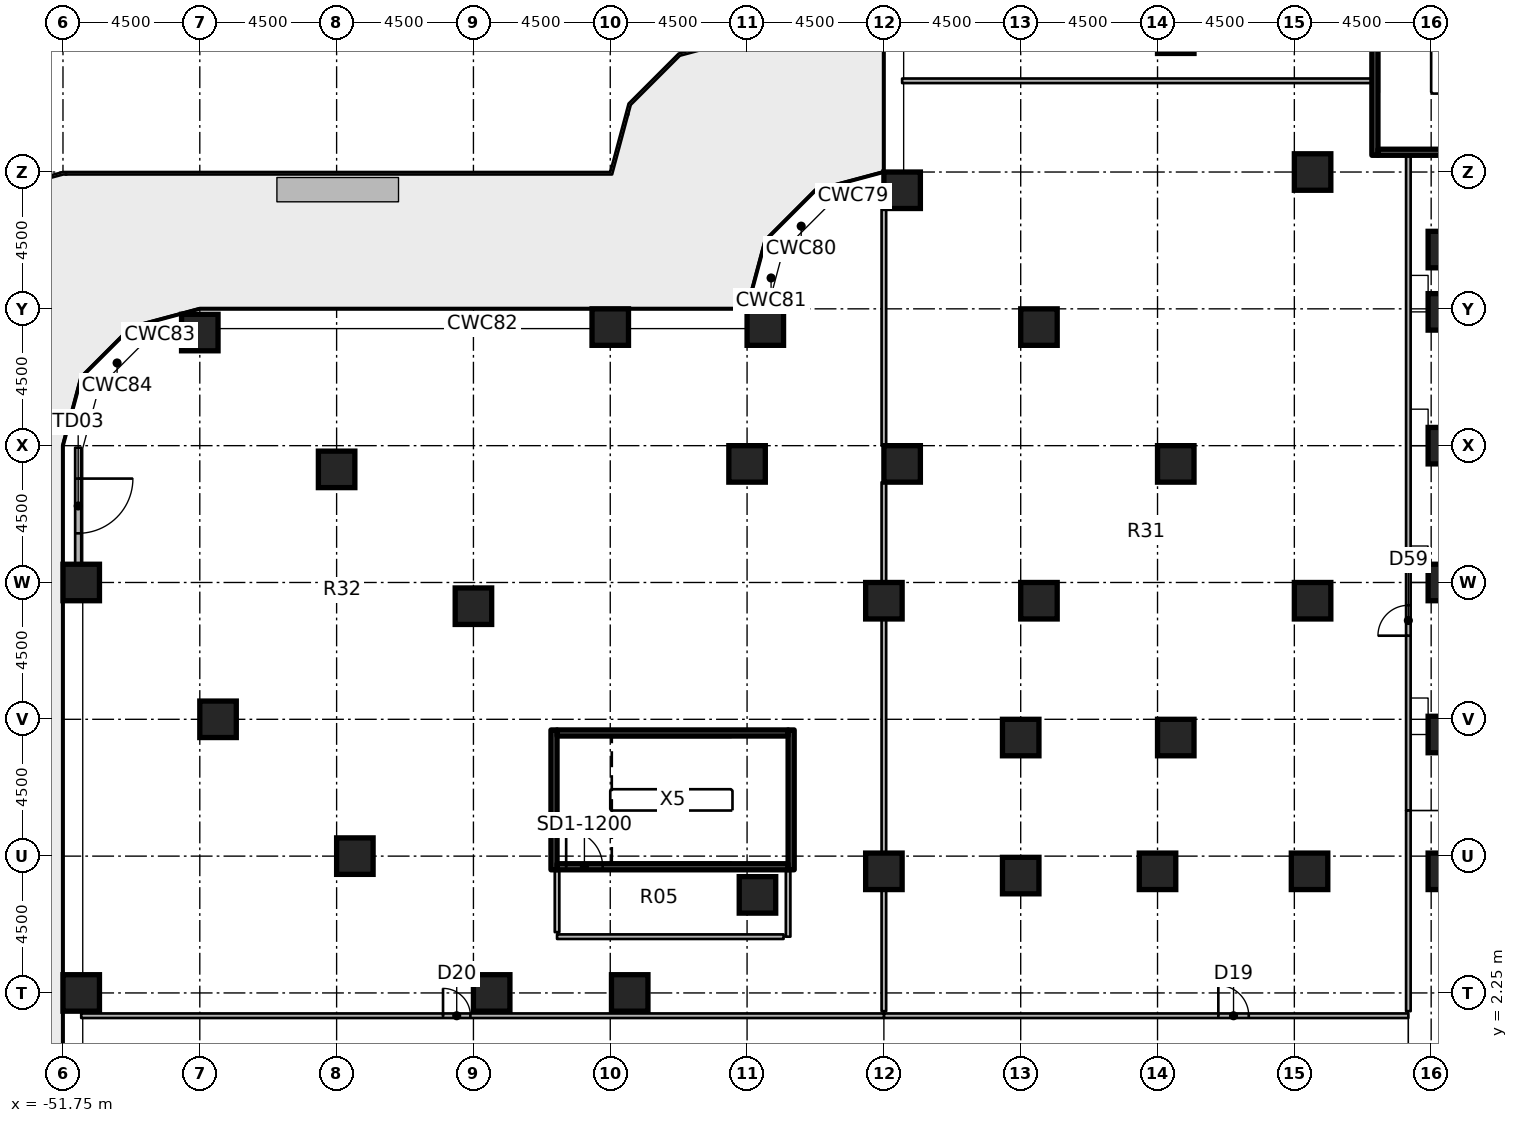
"""IFC4 building model, lengths in metres.
Left out: names, types, materials, properties, quantities, classifications, styles, units other than length and angle.
Written with IfcOpenShell. Run it as: python <this file> out.ifc"""

import sys

from ifc_helpers import new_model, si_unit, direction, frame, frame_2d, origin, origin_2d, place, context, subcontext, project, spatial, rectangle, extrude, element, fill, save


model = new_model("IFC4")
c1 = context("Model", 3, precision=1e-05, world=origin(), true_north=direction((0.0, 1.0)))
c2 = subcontext(c1, "Body", "Model", "MODEL_VIEW")
j1 = project(units=[si_unit("LENGTHUNIT", "METRE"), si_unit("PLANEANGLEUNIT", "RADIAN")], contexts=[c1])
p1 = place(None, origin())
s1 = spatial("IfcSite", under=j1, at=p1, CompositionType="ELEMENT")
p2 = place(p1, origin())
s2 = spatial("IfcBuilding", under=s1, at=p2, CompositionType="ELEMENT")
p3 = place(p2, frame((0.0, 0.0, 7.0)))
s3 = spatial("IfcBuildingStorey", under=s2, at=p3, CompositionType="ELEMENT", Elevation=7.0)
for number, where, z_axis, x_axis in (
    (1, (-51.15, 2.25, 0.0), (0.0, 0.0, 1.0), (1.0, 0.0, 0.0)),
    (2, (-51.15, 15.75, 0.0), (0.0, 0.0, 1.0), (1.0, 0.0, 0.0)),
    (3, (-46.65, 11.25, 0.0), (0.0, 0.0, 1.0), (1.0, 0.0, 0.0)),
    (4, (-47.25, 23.97, 0.0), (0.0, 0.0, 1.0), (1.0, 0.0, 0.0)),
    (5, (-42.15, 6.75, 0.0), (0.0, 0.0, 1.0), (1.0, 0.0, 0.0)),
    (6, (-42.75, 19.47, 0.0), (0.0, 0.0, 1.0), (1.0, 0.0, 0.0)),
    (7, (-37.65, 2.25, 0.0), (0.0, 0.0, 1.0), (1.0, 0.0, 0.0)),
    (8, (-38.25, 14.97, 0.0), (0.0, 0.0, 1.0), (1.0, 0.0, 0.0)),
    (9, (-33.11, 2.25, 0.0), (0.0, 0.0, 1.0), (1.0, 0.0, 0.0)),
    (10, (-33.75, 24.15, 0.0), (0.0, 0.0, 1.0), (1.0, 0.0, 0.0)),
    (11, (-28.908, 5.475, 0.0), (0.0, 0.0, 1.0), (1.0, 0.0, 0.0)),
    (12, (-29.25, 19.65, 0.0), (0.0, 0.0, 1.0), (1.0, 0.0, 0.0)),
    (13, (-28.65, 24.15, 0.0), (0.0, 0.0, 1.0), (1.0, 0.0, 0.0)),
    (14, (-24.75, 6.25, 0.0), (0.0, 0.0, 1.0), (1.0, 0.0, 0.0)),
    (15, (-24.75, 15.15, 0.0), (0.0, 0.0, 1.0), (1.0, 0.0, 0.0)),
    (16, (-24.15, 19.65, 0.0), (0.0, 0.0, 1.0), (1.0, 0.0, 0.0)),
    (17, (-24.15, 28.65, 0.0), (0.0, 0.0, 1.0), (1.0, 0.0, 0.0)),
    (18, (-20.25, 6.11, 0.0), (0.0, 0.0, 1.0), (1.0, 0.0, 0.0)),
    (19, (-20.25, 10.65, 0.0), (0.0, 0.0, 1.0), (1.0, 0.0, 0.0)),
    (20, (-19.65, 15.15, 0.0), (0.0, 0.0, 1.0), (1.0, 0.0, 0.0)),
    (21, (-19.65, 24.15, 0.0), (0.0, 0.0, 1.0), (1.0, 0.0, 0.0)),
    (22, (-15.75, 6.25, 0.0), (0.0, 0.0, 1.0), (1.0, 0.0, 0.0)),
    (23, (-15.15, 10.65, 0.0), (0.0, 0.0, 1.0), (1.0, 0.0, 0.0)),
    (24, (-15.15, 19.65, 0.0), (0.0, 0.0, 1.0), (1.0, 0.0, 0.0)),
    (25, (-15.15, 33.75, 0.0), (0.0, 0.0, 1.0), (1.0, 0.0, 0.0)),
    (26, (-10.75, 6.25, 0.0), (0.0, 0.0, 1.0), (1.0, 0.0, 0.0)),
    (27, (-10.65, 15.15, 0.0), (0.0, 0.0, 1.0), (1.0, 0.0, 0.0)),
    (28, (-10.65, 29.25, 0.0), (0.0, 0.0, 1.0), (1.0, 0.0, 0.0)),
    (29, (-6.25, 6.25, 0.0), (0.0, 0.0, 1.0), (1.0, 0.0, 0.0)),
    (30, (-6.25, 10.75, 0.0), (0.0, 0.0, 1.0), (1.0, 0.0, 0.0)),
    (31, (-6.25, 15.75, 0.0), (0.0, 0.0, 1.0), (1.0, 0.0, 0.0)),
    (32, (-6.25, 20.25, 0.0), (0.0, 0.0, 1.0), (1.0, 0.0, 0.0)),
    (33, (-6.25, 24.65, 0.0), (0.0, 0.0, 1.0), (1.0, 0.0, 0.0)),
    (34, (-6.25, 26.7, 0.0), (0.0, 0.0, 1.0), (1.0, 0.0, 0.0)),
):
    element("IfcColumn", number, at=place(p3, frame(where, z_axis=z_axis, x_axis=x_axis)), inside=s3, PredefinedType="COLUMN", context=c2, shape_type="SweptSolid", body=[
        extrude(rectangle(XDim=1.2, YDim=1.2, at=origin_2d()), origin(), (0.0, 0.0, 1.0), 4.55),
    ])
p4 = place(p3, frame((-51.25, 20.184, 0.0), z_axis=(0.0, 0.0, 1.0), x_axis=(0.0, -1.0, 0.0)))
e35 = element("IfcWall", 35, at=p4, inside=s3, PredefinedType="SOLIDWALL", context=c2, shape_type="SweptSolid", body=[
    extrude(rectangle(XDim=3.834, YDim=0.2, at=frame_2d((1.917, 0.0))), origin(), (0.0, 0.0, 1.0), 4.55),
])
p5 = place(p4, frame((1.017, 0.0, 0.0)))
e36 = element("IfcOpeningElement", 36, at=p5, cuts=e35, PredefinedType="OPENING", context=c2, shape_type="SweptSolid", body=[
    extrude(rectangle(XDim=1.8, YDim=2.4, at=frame_2d((0.9, 1.2))), frame((0.0, 0.11, 0.0), z_axis=(0.0, -1.0, 0.0), x_axis=(1.0, 0.0, 0.0)), (0.0, 0.0, 1.0), 0.22),
])
p6 = place(p3, frame((-8.6, 29.8, 0.0), z_axis=(0.0, 0.0, 1.0), x_axis=(0.0, 1.0, 0.0)))
e37 = element("IfcWall", 37, at=p6, inside=s3, PredefinedType="SHEAR", context=c2, shape_type="SweptSolid", body=[
    extrude(rectangle(XDim=8.0, YDim=0.2, at=frame_2d((4.0, 0.0))), origin(), (0.0, 0.0, 1.0), 4.55),
])
p7 = place(p3, frame((-8.5, 29.9, 0.0), z_axis=(0.0, 0.0, 1.0), x_axis=(1.0, 0.0, 0.0)))
e38 = element("IfcWall", 38, at=p7, inside=s3, PredefinedType="SHEAR", context=c2, shape_type="SweptSolid", body=[
    extrude(rectangle(XDim=4.2, YDim=0.2, at=frame_2d((2.1, 0.0))), origin(), (0.0, 0.0, 1.0), 4.55),
])
for number, where, z_axis, x_axis in (
    (39, (-35.6, 6.3, 0.0), (0.0, 0.0, 1.0), (0.0, 1.0, 0.0)),
    (40, (-27.8, 6.3, 0.0), (0.0, 0.0, 1.0), (0.0, 1.0, 0.0)),
):
    element("IfcWall", number, at=place(p3, frame(where, z_axis=z_axis, x_axis=x_axis)), inside=s3, PredefinedType="SHEAR", context=c2, shape_type="SweptSolid", body=[
        extrude(rectangle(XDim=4.6, YDim=0.2, at=frame_2d((2.3, 0.0))), origin(), (0.0, 0.0, 1.0), 4.55),
    ])
p8 = place(p3, frame((-35.5, 6.4, 0.0), z_axis=(0.0, 0.0, 1.0), x_axis=(1.0, 0.0, 0.0)))
e41 = element("IfcWall", 41, at=p8, inside=s3, PredefinedType="SHEAR", context=c2, shape_type="SweptSolid", body=[
    extrude(rectangle(XDim=7.6, YDim=0.2, at=frame_2d((3.8, 0.0))), origin(), (0.0, 0.0, 1.0), 4.55),
])
p9 = place(p8, frame((0.3, 0.0, 0.0)))
e42 = element("IfcOpeningElement", 42, at=p9, cuts=e41, PredefinedType="OPENING", context=c2, shape_type="SweptSolid", body=[
    extrude(rectangle(XDim=1.2, YDim=2.1, at=frame_2d((0.6, 1.05))), frame((0.0, 0.11, 0.0), z_axis=(0.0, -1.0, 0.0), x_axis=(1.0, 0.0, 0.0)), (0.0, 0.0, 1.0), 0.22),
])
p10 = place(p3, frame((-35.5, 10.8, 0.0), z_axis=(0.0, 0.0, 1.0), x_axis=(1.0, 0.0, 0.0)))
e43 = element("IfcWall", 43, at=p10, inside=s3, PredefinedType="SHEAR", context=c2, shape_type="SweptSolid", body=[
    extrude(rectangle(XDim=7.6, YDim=0.2, at=frame_2d((3.8, 0.0))), origin(), (0.0, 0.0, 1.0), 4.55),
])
p11 = place(p3, frame((-27.9, 6.3, 0.0), z_axis=(0.0, 0.0, 1.0), x_axis=(0.0, -1.0, 0.0)))
e44 = element("IfcWall", 44, at=p11, inside=s3, PredefinedType="PARTITIONING", context=c2, shape_type="SweptSolid", body=[
    extrude(rectangle(XDim=2.2, YDim=0.15, at=frame_2d((1.1, 0.0))), origin(), (0.0, 0.0, 1.0), 4.55),
])
p12 = place(p3, frame((-28.05, 4.1, 0.0), z_axis=(0.0, 0.0, 1.0), x_axis=(-1.0, 0.0, 0.0)))
e45 = element("IfcWall", 45, at=p12, inside=s3, PredefinedType="PARTITIONING", context=c2, shape_type="SweptSolid", body=[
    extrude(rectangle(XDim=7.45, YDim=0.15, at=frame_2d((3.725, 0.0))), origin(), (0.0, 0.0, 1.0), 4.55),
])
p13 = place(p3, frame((-35.5, 4.25, 0.0), z_axis=(0.0, 0.0, 1.0), x_axis=(0.0, 1.0, 0.0)))
e46 = element("IfcWall", 46, at=p13, inside=s3, PredefinedType="PARTITIONING", context=c2, shape_type="SweptSolid", body=[
    extrude(rectangle(XDim=2.05, YDim=0.15, at=frame_2d((1.025, 0.0))), origin(), (0.0, 0.0, 1.0), 4.55),
])
p14 = place(p3, frame((-7.5, 8.25, 0.0), z_axis=(0.0, 0.0, 1.0), x_axis=(0.0, 1.0, 0.0)))
e47 = element("IfcWall", 47, at=p14, inside=s3, PredefinedType="PARTITIONING", context=c2, shape_type="SweptSolid", body=[
    extrude(rectangle(XDim=21.75, YDim=0.15, at=frame_2d((10.875, 0.0))), origin(), (0.0, 0.0, 1.0), 4.55),
])
p15 = place(p14, frame((5.75, 0.0, 0.0)))
e48 = element("IfcOpeningElement", 48, at=p15, cuts=e47, PredefinedType="OPENING", context=c2, shape_type="SweptSolid", body=[
    extrude(rectangle(XDim=1.0, YDim=2.1, at=frame_2d((0.5, 1.05))), frame((0.0, 0.085, 0.0), z_axis=(0.0, -1.0, 0.0), x_axis=(1.0, 0.0, 0.0)), (0.0, 0.0, 1.0), 0.17),
])
p16 = place(p3, frame((-24.75, 1.5, 0.0), z_axis=(0.0, 0.0, 1.0), x_axis=(1.0, 0.0, 0.0)))
e49 = element("IfcWall", 49, at=p16, inside=s3, PredefinedType="PARTITIONING", context=c2, shape_type="SweptSolid", body=[
    extrude(rectangle(XDim=17.25, YDim=0.15, at=frame_2d((8.625, 0.0))), origin(), (0.0, 0.0, 1.0), 4.55),
])
p17 = place(p16, frame((11.0, 0.0, 0.0)))
e50 = element("IfcOpeningElement", 50, at=p17, cuts=e49, PredefinedType="OPENING", context=c2, shape_type="SweptSolid", body=[
    extrude(rectangle(XDim=1.0, YDim=2.1, at=frame_2d((0.5, 1.05))), frame((0.0, 0.085, 0.0), z_axis=(0.0, -1.0, 0.0), x_axis=(1.0, 0.0, 0.0)), (0.0, 0.0, 1.0), 0.17),
])
p18 = place(p3, frame((-51.15, 1.5, 0.0), z_axis=(0.0, 0.0, 1.0), x_axis=(1.0, 0.0, 0.0)))
e51 = element("IfcWall", 51, at=p18, inside=s3, PredefinedType="PARTITIONING", context=c2, shape_type="SweptSolid", body=[
    extrude(rectangle(XDim=26.4, YDim=0.15, at=frame_2d((13.2, 0.0))), origin(), (0.0, 0.0, 1.0), 4.55),
])
p19 = place(p18, frame((11.9, 0.0, 0.0)))
e52 = element("IfcOpeningElement", 52, at=p19, cuts=e51, PredefinedType="OPENING", context=c2, shape_type="SweptSolid", body=[
    extrude(rectangle(XDim=0.9, YDim=2.1, at=frame_2d((0.45, 1.05))), frame((0.0, 0.085, 0.0), z_axis=(0.0, -1.0, 0.0), x_axis=(1.0, 0.0, 0.0)), (0.0, 0.0, 1.0), 0.17),
])
p20 = place(p3, frame((-24.75, 1.65, 0.0), z_axis=(0.0, 0.0, 1.0), x_axis=(0.0, 1.0, 0.0)))
e53 = element("IfcWall", 53, at=p20, inside=s3, PredefinedType="PARTITIONING", context=c2, shape_type="SweptSolid", body=[
    extrude(rectangle(XDim=4.0, YDim=0.15, at=frame_2d((2.0, 0.0))), origin(), (0.0, 0.0, 1.0), 4.55),
])
p21 = place(p3, frame((-24.75, 6.85, 0.0), z_axis=(0.0, 0.0, 1.0), x_axis=(0.0, 1.0, 0.0)))
e54 = element("IfcWall", 54, at=p21, inside=s3, PredefinedType="PARTITIONING", context=c2, shape_type="SweptSolid", body=[
    extrude(rectangle(XDim=7.7, YDim=0.15, at=frame_2d((3.85, 0.0))), origin(), (0.0, 0.0, 1.0), 4.55),
])
p22 = place(p3, frame((-24.75, 15.75, 0.0), z_axis=(0.0, 0.0, 1.0), x_axis=(0.0, 1.0, 0.0)))
e55 = element("IfcWall", 55, at=p22, inside=s3, PredefinedType="PARTITIONING", context=c2, shape_type="SweptSolid", body=[
    extrude(rectangle(XDim=3.3, YDim=0.15, at=frame_2d((1.65, 0.0))), origin(), (0.0, 0.0, 1.0), 4.55),
])
p23 = place(p3, frame((-24.75, 20.25, 0.0), z_axis=(0.0, 0.0, 1.0), x_axis=(0.0, 1.0, 0.0)))
e56 = element("IfcWall", 56, at=p23, inside=s3, PredefinedType="PARTITIONING", context=c2, shape_type="SweptSolid", body=[
    extrude(rectangle(XDim=7.8, YDim=0.15, at=frame_2d((3.9, 0.0))), origin(), (0.0, 0.0, 1.0), 4.55),
])
p24 = place(p3, frame((-24.15, 32.25, 0.0), z_axis=(0.0, 0.0, 1.0), x_axis=(1.0, 0.0, 0.0)))
e57 = element("IfcWall", 57, at=p24, inside=s3, PredefinedType="PARTITIONING", context=c2, shape_type="SweptSolid", body=[
    extrude(rectangle(XDim=15.45, YDim=0.15, at=frame_2d((7.725, 0.0))), origin(), (0.0, 0.0, 1.0), 4.55),
])
p25 = place(p3, frame((-7.5, 8.25, 0.0), z_axis=(0.0, 0.0, 1.0), x_axis=(0.0, -1.0, 0.0)))
e58 = element("IfcWall", 58, at=p25, inside=s3, PredefinedType="PARTITIONING", context=c2, shape_type="SweptSolid", body=[
    extrude(rectangle(XDim=6.6, YDim=0.15, at=frame_2d((3.3, 0.0))), origin(), (0.0, 0.0, 1.0), 4.55),
])
p26 = place(p5, origin())
e59 = element("IfcDoor", 59, at=p26, inside=s3, OperationType="SINGLE_SWING_LEFT", PredefinedType="DOOR", context=c2, shape_type="SweptSolid", body=[
    extrude(rectangle(XDim=1.8, YDim=2.4, at=frame_2d((0.9, 1.2))), frame((0.0, 0.025, 0.0), z_axis=(0.0, -1.0, 0.0), x_axis=(1.0, 0.0, 0.0)), (0.0, 0.0, 1.0), 0.05),
])
fill(e36, e59)
p27 = place(p9, origin())
e60 = element("IfcDoor", 60, at=p27, inside=s3, OperationType="SINGLE_SWING_RIGHT", PredefinedType="DOOR", context=c2, shape_type="SweptSolid", body=[
    extrude(rectangle(XDim=1.2, YDim=2.1, at=frame_2d((0.6, 1.05))), frame((0.0, 0.025, 0.0), z_axis=(0.0, -1.0, 0.0), x_axis=(1.0, 0.0, 0.0)), (0.0, 0.0, 1.0), 0.05),
])
fill(e42, e60)
p28 = place(p15, origin())
e61 = element("IfcDoor", 61, at=p28, inside=s3, OperationType="SINGLE_SWING_LEFT", PredefinedType="DOOR", context=c2, shape_type="SweptSolid", body=[
    extrude(rectangle(XDim=1.0, YDim=2.1, at=frame_2d((0.5, 1.05))), frame((0.0, 0.025, 0.0), z_axis=(0.0, -1.0, 0.0), x_axis=(1.0, 0.0, 0.0)), (0.0, 0.0, 1.0), 0.05),
])
fill(e48, e61)
p29 = place(p17, origin())
e62 = element("IfcDoor", 62, at=p29, inside=s3, OperationType="SINGLE_SWING_LEFT", PredefinedType="DOOR", context=c2, shape_type="SweptSolid", body=[
    extrude(rectangle(XDim=1.0, YDim=2.1, at=frame_2d((0.5, 1.05))), frame((0.0, 0.025, 0.0), z_axis=(0.0, -1.0, 0.0), x_axis=(1.0, 0.0, 0.0)), (0.0, 0.0, 1.0), 0.05),
])
fill(e50, e62)
p30 = place(p19, origin())
e63 = element("IfcDoor", 63, at=p30, inside=s3, OperationType="SINGLE_SWING_LEFT", PredefinedType="DOOR", context=c2, shape_type="SweptSolid", body=[
    extrude(rectangle(XDim=0.9, YDim=2.1, at=frame_2d((0.45, 1.05))), frame((0.0, 0.025, 0.0), z_axis=(0.0, -1.0, 0.0), x_axis=(1.0, 0.0, 0.0)), (0.0, 0.0, 1.0), 0.05),
])
fill(e52, e63)
save(model, sys.argv[1])
